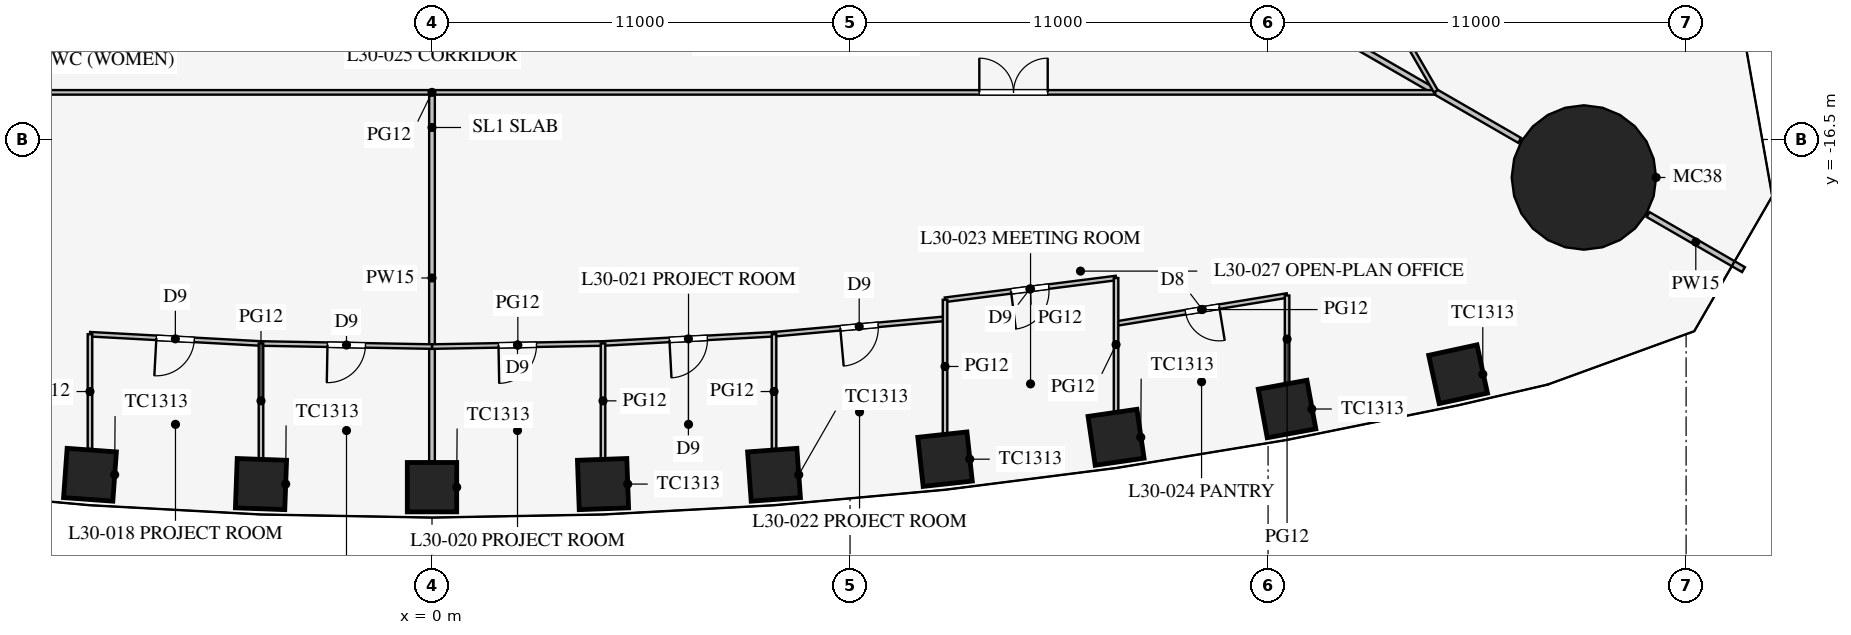
"""IFC4 building model, lengths in metres.
Left out: names, types, materials, properties, quantities, classifications, styles, units other than length and angle.
Written with IfcOpenShell. Run it as: python <this file> out.ifc"""

import sys

from ifc_helpers import new_model, si_unit, direction, frame, frame_2d, origin, origin_2d, place, context, subcontext, project, spatial, rectangle, circle, extrude, element, fill, save


model = new_model("IFC4")
c1 = context("Model", 3, precision=1e-05, world=origin(), true_north=direction((0.0, 1.0)))
c2 = subcontext(c1, "Body", "Model", "MODEL_VIEW")
j1 = project(units=[si_unit("LENGTHUNIT", "METRE"), si_unit("PLANEANGLEUNIT", "RADIAN")], contexts=[c1])
p1 = place(None, origin())
s1 = spatial("IfcSite", under=j1, at=p1, CompositionType="ELEMENT")
p2 = place(p1, origin())
s2 = spatial("IfcBuilding", under=s1, at=p2, CompositionType="ELEMENT")
p3 = place(p2, frame((0.0, 0.0, 132.5)))
s3 = spatial("IfcBuildingStorey", under=s2, at=p3, CompositionType="ELEMENT", Elevation=132.5)
for number, where, z_axis, x_axis in (
    (1, (-9.0, -25.323, 0.0), (0.0, 0.0, 1.0), (0.997, -0.072, 0.0)),
    (2, (-4.5, -25.568, 0.0), (0.0, 0.0, 1.0), (0.999, -0.036, 0.0)),
    (3, (0.0, -25.65, 0.0), (0.0, 0.0, 1.0), (1.0, 0.0, 0.0)),
    (4, (4.5, -25.568, 0.0), (0.0, 0.0, 1.0), (0.999, 0.036, 0.0)),
    (5, (9.0, -25.323, 0.0), (0.0, 0.0, 1.0), (0.997, 0.072, 0.0)),
    (6, (13.5, -24.913, 0.0), (0.0, 0.0, 1.0), (0.994, 0.108, 0.0)),
    (7, (18.0, -24.337, 0.0), (0.0, 0.0, 1.0), (0.99, 0.144, 0.0)),
    (8, (22.5, -23.593, 0.0), (0.0, 0.0, 1.0), (0.984, 0.18, 0.0)),
    (9, (27.0, -22.677, 0.0), (0.0, 0.0, 1.0), (0.977, 0.212, 0.0)),
):
    element("IfcColumn", number, at=place(p3, frame(where, z_axis=z_axis, x_axis=x_axis)), inside=s3, PredefinedType="COLUMN", context=c2, shape_type="SweptSolid", body=[
        extrude(rectangle(XDim=1.3, YDim=1.3, at=origin_2d()), origin(), (0.0, 0.0, 1.0), 4.2),
    ])
p4 = place(p3, frame((30.311, -17.5, 0.0), z_axis=(0.0, 0.0, 1.0), x_axis=(1.0, 0.0, 0.0)))
e10 = element("IfcColumn", 10, at=p4, inside=s3, PredefinedType="COLUMN", context=c2, shape_type="SweptSolid", body=[
    extrude(circle(Radius=1.9, at=origin_2d()), origin(), (0.0, 0.0, 1.0), 4.2),
])
p5 = place(p3, frame((14.203, -8.2, 0.0), z_axis=(0.0, 0.0, 1.0), x_axis=(0.866024668836, -0.500001272966, 0.0)))
e11 = element("IfcWall", 11, at=p5, inside=s3, PredefinedType="PARTITIONING", context=c2, shape_type="SweptSolid", body=[
    extrude(rectangle(XDim=16.65, YDim=0.15, at=frame_2d((8.325, 0.0))), origin(), (0.0, 0.0, 1.0), 2.3),
])
p6 = place(p3, frame((32.0, -18.475, 0.0), z_axis=(0.0, 0.0, 1.0), x_axis=(0.866042548026, -0.499970304126, 0.0)))
e12 = element("IfcWall", 12, at=p6, inside=s3, PredefinedType="PARTITIONING", context=c2, shape_type="SweptSolid", body=[
    extrude(rectangle(XDim=2.899, YDim=0.15, at=frame_2d((1.45, 0.0))), origin(), (0.0, 0.0, 1.0), 2.3),
])
p7 = place(p3, frame((0.0, -15.32, 0.0), z_axis=(0.0, 0.0, 1.0), x_axis=(0.0, -1.0, 0.0)))
e13 = element("IfcWall", 13, at=p7, inside=s3, PredefinedType="PARTITIONING", context=c2, shape_type="SweptSolid", body=[
    extrude(rectangle(XDim=9.65, YDim=0.15, at=frame_2d((4.825, 0.0))), origin(), (0.0, 0.0, 1.0), 3.2),
])
p8 = place(p3, frame((-26.398, -15.26, 0.0), z_axis=(0.0, 0.0, 1.0), x_axis=(1.0, 0.0, 0.0)))
e14 = element("IfcWall", 14, at=p8, inside=s3, PredefinedType="PARTITIONING", context=c2, shape_type="SweptSolid", body=[
    extrude(rectangle(XDim=52.796, YDim=0.12, at=frame_2d((26.398, 0.0))), origin(), (0.0, 0.0, 1.0), 2.9),
])
p9 = place(p8, frame((10.2, 0.0, 0.15)))
e15 = element("IfcOpeningElement", 15, at=p9, cuts=e14, PredefinedType="OPENING", context=c2, shape_type="SweptSolid", body=[
    extrude(rectangle(XDim=1.8, YDim=2.1, at=frame_2d((0.9, 1.05))), frame((0.0, 0.07, 0.0), z_axis=(0.0, -1.0, 0.0), x_axis=(1.0, 0.0, 0.0)), (0.0, 0.0, 1.0), 0.14),
])
p10 = place(p8, frame((40.8, 0.0, 0.15)))
e16 = element("IfcOpeningElement", 16, at=p10, cuts=e14, PredefinedType="OPENING", context=c2, shape_type="SweptSolid", body=[
    extrude(rectangle(XDim=1.8, YDim=2.1, at=frame_2d((0.9, 1.05))), frame((0.0, 0.07, 0.0), z_axis=(0.0, -1.0, 0.0), x_axis=(1.0, 0.0, 0.0)), (0.0, 0.0, 1.0), 0.14),
])
p11 = place(p3, frame((0.0, -21.95, 0.0), z_axis=(0.0, 0.0, 1.0), x_axis=(0.999837820638, 0.018009231578, 0.0)))
e17 = element("IfcWall", 17, at=p11, inside=s3, PredefinedType="PARTITIONING", context=c2, shape_type="SweptSolid", body=[
    extrude(rectangle(XDim=4.501, YDim=0.12, at=frame_2d((2.25, 0.0))), origin(), (0.0, 0.0, 1.0), 2.9),
])
p12 = place(p11, frame((1.75, 0.0, 0.15)))
e18 = element("IfcOpeningElement", 18, at=p12, cuts=e17, PredefinedType="OPENING", context=c2, shape_type="SweptSolid", body=[
    extrude(rectangle(XDim=1.0, YDim=2.1, at=frame_2d((0.5, 1.05))), frame((0.0, 0.07, 0.0), z_axis=(0.0, -1.0, 0.0), x_axis=(1.0, 0.0, 0.0)), (0.0, 0.0, 1.0), 0.14),
])
p13 = place(p3, frame((13.5, -20.718, 0.0), z_axis=(0.0, 0.0, 1.0), x_axis=(0.992010652594, 0.12615413247, 0.0)))
e19 = element("IfcWall", 19, at=p13, inside=s3, PredefinedType="PARTITIONING", context=c2, shape_type="SweptSolid", body=[
    extrude(rectangle(XDim=4.536, YDim=0.12, at=frame_2d((2.268, 0.0))), origin(), (0.0, 0.0, 1.0), 2.9),
])
p14 = place(p13, frame((1.75, 0.0, 0.15)))
e20 = element("IfcOpeningElement", 20, at=p14, cuts=e19, PredefinedType="OPENING", context=c2, shape_type="SweptSolid", body=[
    extrude(rectangle(XDim=1.0, YDim=2.1, at=frame_2d((0.5, 1.05))), frame((0.0, 0.07, 0.0), z_axis=(0.0, -1.0, 0.0), x_axis=(1.0, 0.0, 0.0)), (0.0, 0.0, 1.0), 0.14),
])
p15 = place(p3, frame((18.0, -21.345, 0.0), z_axis=(0.0, 0.0, 1.0), x_axis=(0.986764681833, 0.162158757664, 0.0)))
e21 = element("IfcWall", 21, at=p15, inside=s3, PredefinedType="PARTITIONING", context=c2, shape_type="SweptSolid", body=[
    extrude(rectangle(XDim=4.56, YDim=0.12, at=frame_2d((2.28, 0.0))), origin(), (0.0, 0.0, 1.0), 2.9),
])
p16 = place(p15, frame((1.85, 0.0, 0.15)))
e22 = element("IfcOpeningElement", 22, at=p16, cuts=e21, PredefinedType="OPENING", context=c2, shape_type="SweptSolid", body=[
    extrude(rectangle(XDim=0.9, YDim=2.1, at=frame_2d((0.45, 1.05))), frame((0.0, 0.07, 0.0), z_axis=(0.0, -1.0, 0.0), x_axis=(1.0, 0.0, 0.0)), (0.0, 0.0, 1.0), 0.14),
])
p17 = place(p3, frame((4.5, -21.869, 0.0), z_axis=(0.0, 0.0, 1.0), x_axis=(0.998537376538, 0.054065771581, 0.0)))
e23 = element("IfcWall", 23, at=p17, inside=s3, PredefinedType="PARTITIONING", context=c2, shape_type="SweptSolid", body=[
    extrude(rectangle(XDim=4.507, YDim=0.12, at=frame_2d((2.253, 0.0))), origin(), (0.0, 0.0, 1.0), 2.9),
])
p18 = place(p17, frame((1.75, 0.0, 0.15)))
e24 = element("IfcOpeningElement", 24, at=p18, cuts=e23, PredefinedType="OPENING", context=c2, shape_type="SweptSolid", body=[
    extrude(rectangle(XDim=1.0, YDim=2.1, at=frame_2d((0.5, 1.05))), frame((0.0, 0.07, 0.0), z_axis=(0.0, -1.0, 0.0), x_axis=(1.0, 0.0, 0.0)), (0.0, 0.0, 1.0), 0.14),
])
p19 = place(p3, frame((9.0, -21.625, 0.0), z_axis=(0.0, 0.0, 1.0), x_axis=(0.995930325215, 0.090126507295, 0.0)))
e25 = element("IfcWall", 25, at=p19, inside=s3, PredefinedType="PARTITIONING", context=c2, shape_type="SweptSolid", body=[
    extrude(rectangle(XDim=4.518, YDim=0.12, at=frame_2d((2.259, 0.0))), origin(), (0.0, 0.0, 1.0), 2.9),
])
p20 = place(p19, frame((1.75, 0.0, 0.15)))
e26 = element("IfcOpeningElement", 26, at=p20, cuts=e25, PredefinedType="OPENING", context=c2, shape_type="SweptSolid", body=[
    extrude(rectangle(XDim=1.0, YDim=2.1, at=frame_2d((0.5, 1.05))), frame((0.0, 0.07, 0.0), z_axis=(0.0, -1.0, 0.0), x_axis=(1.0, 0.0, 0.0)), (0.0, 0.0, 1.0), 0.14),
])
p21 = place(p3, frame((-4.5, -21.869, 0.0), z_axis=(0.0, 0.0, 1.0), x_axis=(0.999837820638, -0.018009231578, 0.0)))
e27 = element("IfcWall", 27, at=p21, inside=s3, PredefinedType="PARTITIONING", context=c2, shape_type="SweptSolid", body=[
    extrude(rectangle(XDim=4.501, YDim=0.12, at=frame_2d((2.25, 0.0))), origin(), (0.0, 0.0, 1.0), 2.9),
])
p22 = place(p21, frame((1.75, 0.0, 0.15)))
e28 = element("IfcOpeningElement", 28, at=p22, cuts=e27, PredefinedType="OPENING", context=c2, shape_type="SweptSolid", body=[
    extrude(rectangle(XDim=1.0, YDim=2.1, at=frame_2d((0.5, 1.05))), frame((0.0, 0.07, 0.0), z_axis=(0.0, -1.0, 0.0), x_axis=(1.0, 0.0, 0.0)), (0.0, 0.0, 1.0), 0.14),
])
p23 = place(p3, frame((-9.0, -21.625, 0.0), z_axis=(0.0, 0.0, 1.0), x_axis=(0.998537376538, -0.054065771581, 0.0)))
e29 = element("IfcWall", 29, at=p23, inside=s3, PredefinedType="PARTITIONING", context=c2, shape_type="SweptSolid", body=[
    extrude(rectangle(XDim=4.507, YDim=0.12, at=frame_2d((2.253, 0.0))), origin(), (0.0, 0.0, 1.0), 2.9),
])
p24 = place(p23, frame((1.75, 0.0, 0.15)))
e30 = element("IfcOpeningElement", 30, at=p24, cuts=e29, PredefinedType="OPENING", context=c2, shape_type="SweptSolid", body=[
    extrude(rectangle(XDim=1.0, YDim=2.1, at=frame_2d((0.5, 1.05))), frame((0.0, 0.07, 0.0), z_axis=(0.0, -1.0, 0.0), x_axis=(1.0, 0.0, 0.0)), (0.0, 0.0, 1.0), 0.14),
])
p25 = place(p3, frame((13.5, -20.718, 0.0), z_axis=(0.0, 0.0, 1.0), x_axis=(0.0, -1.0, 0.0)))
e31 = element("IfcWall", 31, at=p25, inside=s3, PredefinedType="PARTITIONING", context=c2, shape_type="SweptSolid", body=[
    extrude(rectangle(XDim=3.511, YDim=0.12, at=frame_2d((1.756, 0.0))), origin(), (0.0, 0.0, 1.0), 2.9),
])
p26 = place(p3, frame((18.0, -20.146, 0.0), z_axis=(0.0, 0.0, 1.0), x_axis=(0.0, -1.0, 0.0)))
e32 = element("IfcWall", 32, at=p26, inside=s3, PredefinedType="PARTITIONING", context=c2, shape_type="SweptSolid", body=[
    extrude(rectangle(XDim=3.505, YDim=0.12, at=frame_2d((1.752, 0.0))), origin(), (0.0, 0.0, 1.0), 2.9),
])
p27 = place(p3, frame((22.5, -20.606, 0.0), z_axis=(0.0, 0.0, 1.0), x_axis=(0.0, -1.0, 0.0)))
e33 = element("IfcWall", 33, at=p27, inside=s3, PredefinedType="PARTITIONING", context=c2, shape_type="SweptSolid", body=[
    extrude(rectangle(XDim=2.295, YDim=0.12, at=frame_2d((1.148, 0.0))), origin(), (0.0, 0.0, 1.0), 2.9),
])
p28 = place(p3, frame((4.5, -21.869, 0.0), z_axis=(0.0, 0.0, 1.0), x_axis=(0.0, -1.0, 0.0)))
e34 = element("IfcWall", 34, at=p28, inside=s3, PredefinedType="PARTITIONING", context=c2, shape_type="SweptSolid", body=[
    extrude(rectangle(XDim=3.019, YDim=0.12, at=frame_2d((1.51, 0.0))), origin(), (0.0, 0.0, 1.0), 2.9),
])
p29 = place(p3, frame((9.0, -21.625, 0.0), z_axis=(0.0, 0.0, 1.0), x_axis=(0.0, -1.0, 0.0)))
e35 = element("IfcWall", 35, at=p29, inside=s3, PredefinedType="PARTITIONING", context=c2, shape_type="SweptSolid", body=[
    extrude(rectangle(XDim=3.016, YDim=0.12, at=frame_2d((1.508, 0.0))), origin(), (0.0, 0.0, 1.0), 2.9),
])
p30 = place(p3, frame((-4.5, -21.869, 0.0), z_axis=(0.0, 0.0, 1.0), x_axis=(0.0, -1.0, 0.0)))
e36 = element("IfcWall", 36, at=p30, inside=s3, PredefinedType="PARTITIONING", context=c2, shape_type="SweptSolid", body=[
    extrude(rectangle(XDim=3.019, YDim=0.12, at=frame_2d((1.51, 0.0))), origin(), (0.0, 0.0, 1.0), 2.9),
])
p31 = place(p3, frame((-9.0, -21.625, 0.0), z_axis=(0.0, 0.0, 1.0), x_axis=(0.0, -1.0, 0.0)))
e37 = element("IfcWall", 37, at=p31, inside=s3, PredefinedType="PARTITIONING", context=c2, shape_type="SweptSolid", body=[
    extrude(rectangle(XDim=3.016, YDim=0.12, at=frame_2d((1.508, 0.0))), origin(), (0.0, 0.0, 1.0), 2.9),
])
p32 = place(p3, frame((26.415, -15.231, 0.0), z_axis=(0.0, 0.0, 1.0), x_axis=(-0.50000091641, 0.866024874695, 0.0)))
e38 = element("IfcWall", 38, at=p32, inside=s3, PredefinedType="PARTITIONING", context=c2, shape_type="SweptSolid", body=[
    extrude(rectangle(XDim=52.796, YDim=0.12, at=frame_2d((26.398, 0.0))), origin(), (0.0, 0.0, 1.0), 2.9),
])
p33 = place(p32, frame((10.2, 0.0, 0.15)))
e39 = element("IfcOpeningElement", 39, at=p33, cuts=e38, PredefinedType="OPENING", context=c2, shape_type="SweptSolid", body=[
    extrude(rectangle(XDim=1.8, YDim=2.1, at=frame_2d((0.9, 1.05))), frame((0.0, 0.07, 0.0), z_axis=(0.0, -1.0, 0.0), x_axis=(1.0, 0.0, 0.0)), (0.0, 0.0, 1.0), 0.14),
])
p34 = place(p32, frame((40.8, 0.0, 0.15)))
e40 = element("IfcOpeningElement", 40, at=p34, cuts=e38, PredefinedType="OPENING", context=c2, shape_type="SweptSolid", body=[
    extrude(rectangle(XDim=1.8, YDim=2.1, at=frame_2d((0.9, 1.05))), frame((0.0, 0.07, 0.0), z_axis=(0.0, -1.0, 0.0), x_axis=(1.0, 0.0, 0.0)), (0.0, 0.0, 1.0), 0.14),
])
p35 = place(p3, frame((-0.016, 30.491, 0.0), z_axis=(0.0, 0.0, 1.0), x_axis=(-0.50000091641, -0.866024874695, 0.0)))
e41 = element("IfcWall", 41, at=p35, inside=s3, PredefinedType="PARTITIONING", context=c2, shape_type="SweptSolid", body=[
    extrude(rectangle(XDim=52.796, YDim=0.12, at=frame_2d((26.398, 0.0))), origin(), (0.0, 0.0, 1.0), 2.9),
])
p36 = place(p35, frame((10.2, 0.0, 0.15)))
e42 = element("IfcOpeningElement", 42, at=p36, cuts=e41, PredefinedType="OPENING", context=c2, shape_type="SweptSolid", body=[
    extrude(rectangle(XDim=1.8, YDim=2.1, at=frame_2d((0.9, 1.05))), frame((0.0, 0.07, 0.0), z_axis=(0.0, -1.0, 0.0), x_axis=(1.0, 0.0, 0.0)), (0.0, 0.0, 1.0), 0.14),
])
p37 = place(p35, frame((40.8, 0.0, 0.15)))
e43 = element("IfcOpeningElement", 43, at=p37, cuts=e41, PredefinedType="OPENING", context=c2, shape_type="SweptSolid", body=[
    extrude(rectangle(XDim=1.8, YDim=2.1, at=frame_2d((0.9, 1.05))), frame((0.0, 0.07, 0.0), z_axis=(0.0, -1.0, 0.0), x_axis=(1.0, 0.0, 0.0)), (0.0, 0.0, 1.0), 0.14),
])
p38 = place(p24, frame((1.0, 0.0, 0.0), z_axis=(0.0, 0.0, 1.0), x_axis=(-1.0, 0.0, 0.0)))
e44 = element("IfcDoor", 44, at=p38, inside=s3, OperationType="SINGLE_SWING_RIGHT", PredefinedType="DOOR", context=c2, shape_type="SweptSolid", body=[
    extrude(rectangle(XDim=1.0, YDim=2.1, at=frame_2d((0.5, 1.05))), frame((0.0, 0.025, 0.0), z_axis=(0.0, -1.0, 0.0), x_axis=(1.0, 0.0, 0.0)), (0.0, 0.0, 1.0), 0.05),
])
fill(e30, e44)
p39 = place(p22, frame((1.0, 0.0, 0.0), z_axis=(0.0, 0.0, 1.0), x_axis=(-1.0, 0.0, 0.0)))
e45 = element("IfcDoor", 45, at=p39, inside=s3, OperationType="SINGLE_SWING_RIGHT", PredefinedType="DOOR", context=c2, shape_type="SweptSolid", body=[
    extrude(rectangle(XDim=1.0, YDim=2.1, at=frame_2d((0.5, 1.05))), frame((0.0, 0.025, 0.0), z_axis=(0.0, -1.0, 0.0), x_axis=(1.0, 0.0, 0.0)), (0.0, 0.0, 1.0), 0.05),
])
fill(e28, e45)
p40 = place(p12, frame((1.0, 0.0, 0.0), z_axis=(0.0, 0.0, 1.0), x_axis=(-1.0, 0.0, 0.0)))
e46 = element("IfcDoor", 46, at=p40, inside=s3, OperationType="SINGLE_SWING_RIGHT", PredefinedType="DOOR", context=c2, shape_type="SweptSolid", body=[
    extrude(rectangle(XDim=1.0, YDim=2.1, at=frame_2d((0.5, 1.05))), frame((0.0, 0.025, 0.0), z_axis=(0.0, -1.0, 0.0), x_axis=(1.0, 0.0, 0.0)), (0.0, 0.0, 1.0), 0.05),
])
fill(e18, e46)
p41 = place(p18, frame((1.0, 0.0, 0.0), z_axis=(0.0, 0.0, 1.0), x_axis=(-1.0, 0.0, 0.0)))
e47 = element("IfcDoor", 47, at=p41, inside=s3, OperationType="SINGLE_SWING_RIGHT", PredefinedType="DOOR", context=c2, shape_type="SweptSolid", body=[
    extrude(rectangle(XDim=1.0, YDim=2.1, at=frame_2d((0.5, 1.05))), frame((0.0, 0.025, 0.0), z_axis=(0.0, -1.0, 0.0), x_axis=(1.0, 0.0, 0.0)), (0.0, 0.0, 1.0), 0.05),
])
fill(e24, e47)
p42 = place(p20, frame((1.0, 0.0, 0.0), z_axis=(0.0, 0.0, 1.0), x_axis=(-1.0, 0.0, 0.0)))
e48 = element("IfcDoor", 48, at=p42, inside=s3, OperationType="SINGLE_SWING_RIGHT", PredefinedType="DOOR", context=c2, shape_type="SweptSolid", body=[
    extrude(rectangle(XDim=1.0, YDim=2.1, at=frame_2d((0.5, 1.05))), frame((0.0, 0.025, 0.0), z_axis=(0.0, -1.0, 0.0), x_axis=(1.0, 0.0, 0.0)), (0.0, 0.0, 1.0), 0.05),
])
fill(e26, e48)
p43 = place(p14, frame((1.0, 0.0, 0.0), z_axis=(0.0, 0.0, 1.0), x_axis=(-1.0, 0.0, 0.0)))
e49 = element("IfcDoor", 49, at=p43, inside=s3, OperationType="SINGLE_SWING_RIGHT", PredefinedType="DOOR", context=c2, shape_type="SweptSolid", body=[
    extrude(rectangle(XDim=1.0, YDim=2.1, at=frame_2d((0.5, 1.05))), frame((0.0, 0.025, 0.0), z_axis=(0.0, -1.0, 0.0), x_axis=(1.0, 0.0, 0.0)), (0.0, 0.0, 1.0), 0.05),
])
fill(e20, e49)
p44 = place(p16, frame((0.9, 0.0, 0.0), z_axis=(0.0, 0.0, 1.0), x_axis=(-1.0, 0.0, 0.0)))
e50 = element("IfcDoor", 50, at=p44, inside=s3, OperationType="SINGLE_SWING_LEFT", PredefinedType="DOOR", context=c2, shape_type="SweptSolid", body=[
    extrude(rectangle(XDim=0.9, YDim=2.1, at=frame_2d((0.45, 1.05))), frame((0.0, 0.025, 0.0), z_axis=(0.0, -1.0, 0.0), x_axis=(1.0, 0.0, 0.0)), (0.0, 0.0, 1.0), 0.05),
])
fill(e22, e50)
p45 = place(p10, origin())
e51 = element("IfcDoor", 51, at=p45, inside=s3, OperationType="DOUBLE_DOOR_SINGLE_SWING", PredefinedType="DOOR", context=c2, shape_type="SweptSolid", body=[
    extrude(rectangle(XDim=1.8, YDim=2.1, at=frame_2d((0.9, 1.05))), frame((0.0, 0.025, 0.0), z_axis=(0.0, -1.0, 0.0), x_axis=(1.0, 0.0, 0.0)), (0.0, 0.0, 1.0), 0.05),
])
fill(e16, e51)
save(model, sys.argv[1])
